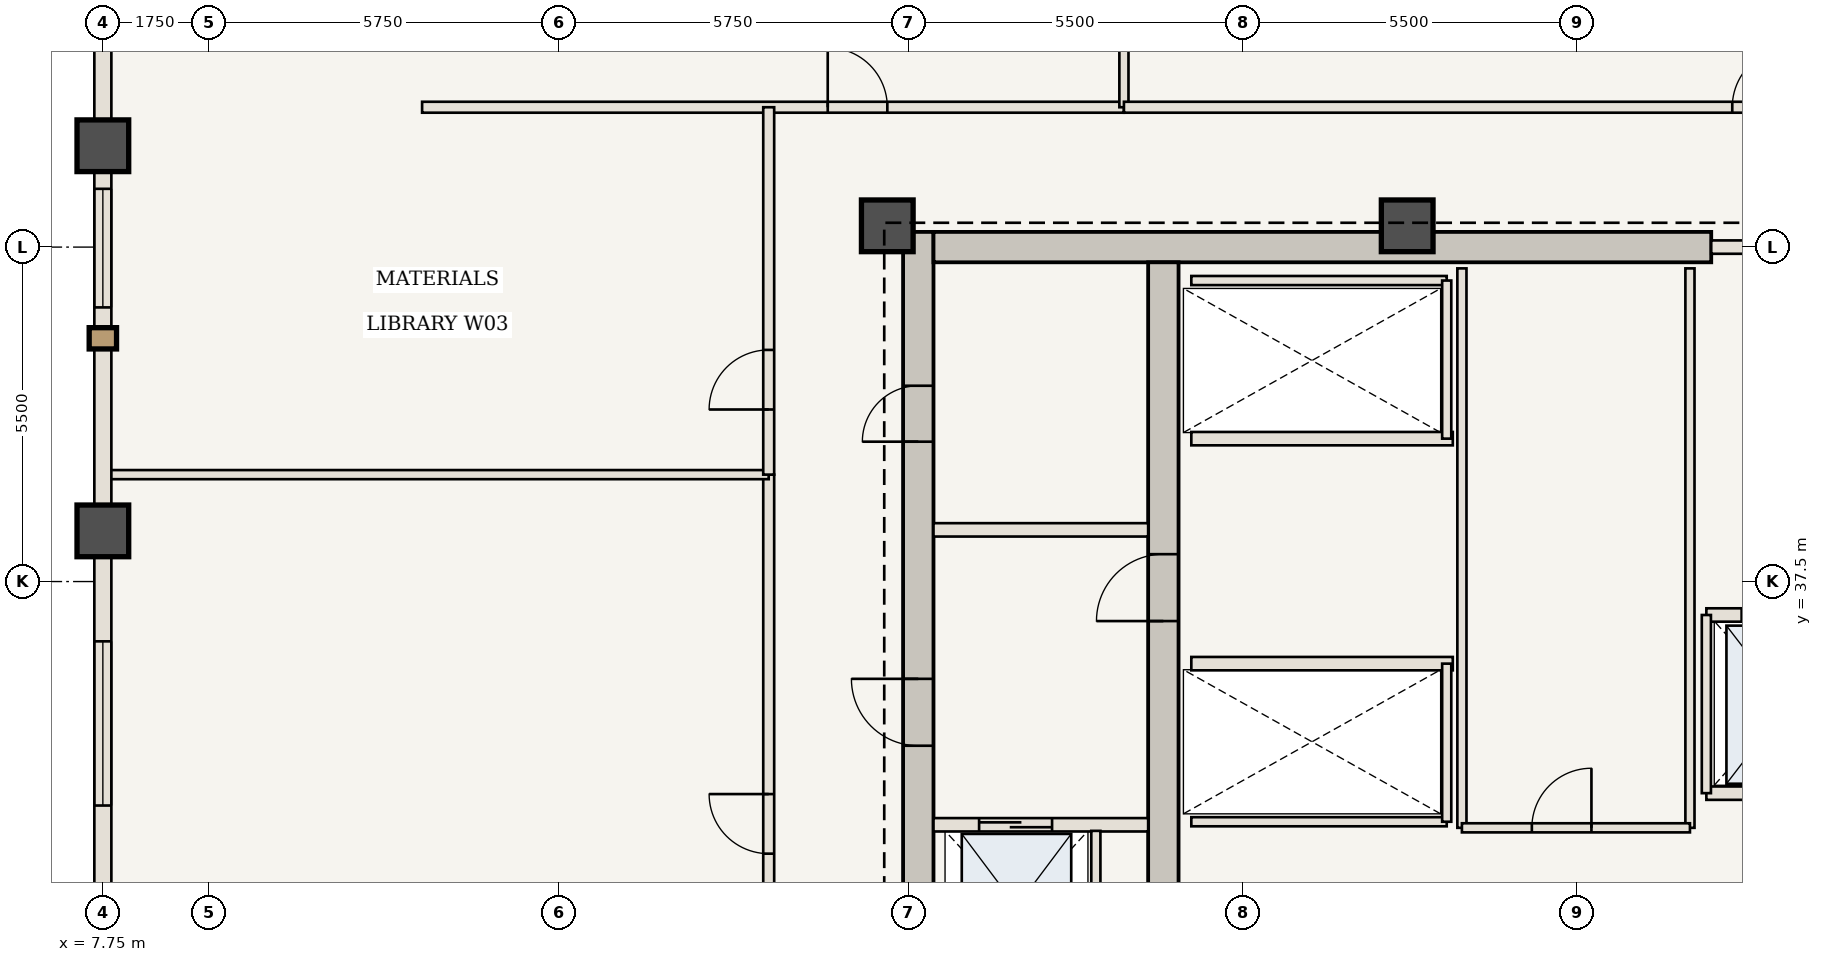
"""IFC4 building model, lengths in metres.
Left out: names, types, materials, properties, quantities, classifications, styles, units other than length and angle.
Written with IfcOpenShell. Run it as: python <this file> out.ifc"""

import sys

from ifc_helpers import new_model, si_unit, direction, frame, frame_2d, origin, origin_2d, place, context, subcontext, project, spatial, rectangle, extrude, element, fill, save


model = new_model("IFC4")
c1 = context("Model", 3, precision=1e-05, world=origin(), true_north=direction((0.0, 1.0)))
c2 = subcontext(c1, "Body", "Model", "MODEL_VIEW")
j1 = project(units=[si_unit("LENGTHUNIT", "METRE"), si_unit("PLANEANGLEUNIT", "RADIAN")], contexts=[c1])
p1 = place(None, origin())
s1 = spatial("IfcSite", under=j1, at=p1, CompositionType="ELEMENT")
p2 = place(p1, origin())
s2 = spatial("IfcBuilding", under=s1, at=p2, CompositionType="ELEMENT")
p3 = place(p2, frame((0.0, 0.0, 210.0)))
s3 = spatial("IfcBuildingStorey", under=s2, at=p3, CompositionType="ELEMENT", Elevation=210.0)
p4 = place(p3, frame((21.16, 30.6, 0.0), z_axis=(0.0, 0.0, 1.0), x_axis=(0.0, 1.0, 0.0)))
e1 = element("IfcWall", 1, at=p4, inside=s3, PredefinedType="SHEAR", context=c2, shape_type="SweptSolid", body=[
    extrude(rectangle(XDim=12.65, YDim=0.5, at=frame_2d((6.325, 0.0))), origin(), (0.0, 0.0, 1.0), 3.85),
])
p5 = place(p4, frame((4.2, 0.0, 0.0)))
e2 = element("IfcOpeningElement", 2, at=p5, cuts=e1, PredefinedType="OPENING", context=c2, shape_type="SweptSolid", body=[
    extrude(rectangle(XDim=1.1, YDim=2.15, at=frame_2d((0.55, 1.075))), frame((0.0, 0.26, 0.0), z_axis=(0.0, -1.0, 0.0), x_axis=(1.0, 0.0, 0.0)), (0.0, 0.0, 1.0), 0.52),
])
p6 = place(p4, frame((9.2, 0.0, 0.0)))
e3 = element("IfcOpeningElement", 3, at=p6, cuts=e1, PredefinedType="OPENING", context=c2, shape_type="SweptSolid", body=[
    extrude(rectangle(XDim=0.92, YDim=2.1, at=frame_2d((0.46, 1.05))), frame((0.0, 0.26, 0.0), z_axis=(0.0, -1.0, 0.0), x_axis=(1.0, 0.0, 0.0)), (0.0, 0.0, 1.0), 0.52),
])
p7 = place(p3, frame((21.41, 43.0, 0.0), z_axis=(0.0, 0.0, 1.0), x_axis=(1.0, 0.0, 0.0)))
e4 = element("IfcWall", 4, at=p7, inside=s3, PredefinedType="SHEAR", context=c2, shape_type="SweptSolid", body=[
    extrude(rectangle(XDim=12.79, YDim=0.5, at=frame_2d((6.395, 0.0))), origin(), (0.0, 0.0, 1.0), 3.85),
])
p8 = place(p3, frame((25.19, 30.6, 0.0), z_axis=(0.0, 0.0, 1.0), x_axis=(0.0, 1.0, 0.0)))
e5 = element("IfcWall", 5, at=p8, inside=s3, PredefinedType="SHEAR", context=c2, shape_type="SweptSolid", body=[
    extrude(rectangle(XDim=12.15, YDim=0.5, at=frame_2d((6.075, 0.0))), origin(), (0.0, 0.0, 1.0), 3.85),
])
p9 = place(p8, frame((6.25, 0.0, 0.0)))
e6 = element("IfcOpeningElement", 6, at=p9, cuts=e5, PredefinedType="OPENING", context=c2, shape_type="SweptSolid", body=[
    extrude(rectangle(XDim=1.1, YDim=2.15, at=frame_2d((0.55, 1.075))), frame((0.0, 0.26, 0.0), z_axis=(0.0, -1.0, 0.0), x_axis=(1.0, 0.0, 0.0)), (0.0, 0.0, 1.0), 0.52),
])
for number, where, z_axis, x_axis in (
    (7, (29.2, 43.35, 0.0), (0.0, 0.0, 1.0), (1.0, 0.0, 0.0)),
    (8, (20.65, 43.35, 0.0), (0.0, 0.0, 1.0), (1.0, 0.0, 0.0)),
    (9, (7.75, 38.333, 0.0), (0.0, 0.0, 1.0), (1.0, 0.0, 0.0)),
    (10, (7.75, 44.667, 0.0), (0.0, 0.0, 1.0), (1.0, 0.0, 0.0)),
):
    element("IfcColumn", number, at=place(p3, frame(where, z_axis=z_axis, x_axis=x_axis)), inside=s3, PredefinedType="COLUMN", context=c2, shape_type="SweptSolid", body=[
        extrude(rectangle(XDim=0.85, YDim=0.85, at=origin_2d()), origin(), (0.0, 0.0, 1.0), 3.85),
    ])
p10 = place(p3, frame((21.41, 33.5, 0.0), z_axis=(0.0, 0.0, 1.0), x_axis=(1.0, 0.0, 0.0)))
e11 = element("IfcWall", 11, at=p10, inside=s3, PredefinedType="STANDARD", context=c2, shape_type="SweptSolid", body=[
    extrude(rectangle(XDim=3.53, YDim=0.22, at=frame_2d((1.765, 0.0))), origin(), (0.0, 0.0, 1.0), 3.685),
])
p11 = place(p10, frame((0.75, 0.0, 0.0)))
e12 = element("IfcOpeningElement", 12, at=p11, cuts=e11, PredefinedType="OPENING", context=c2, shape_type="SweptSolid", body=[
    extrude(rectangle(XDim=1.2, YDim=2.2, at=frame_2d((0.6, 1.1))), frame((0.0, 0.12, 0.0), z_axis=(0.0, -1.0, 0.0), x_axis=(1.0, 0.0, 0.0)), (0.0, 0.0, 1.0), 0.24),
])
p12 = place(p3, frame((24.08, 30.75, 0.0), z_axis=(0.0, 0.0, 1.0), x_axis=(0.0, 1.0, 0.0)))
e13 = element("IfcWall", 13, at=p12, inside=s3, PredefinedType="STANDARD", context=c2, shape_type="SweptSolid", body=[
    extrude(rectangle(XDim=2.65, YDim=0.15, at=frame_2d((1.325, 0.0))), origin(), (0.0, 0.0, 1.0), 3.685),
])
p13 = place(p3, frame((21.41, 38.35, 0.0), z_axis=(0.0, 0.0, 1.0), x_axis=(1.0, 0.0, 0.0)))
e14 = element("IfcWall", 14, at=p13, inside=s3, PredefinedType="STANDARD", context=c2, shape_type="SweptSolid", body=[
    extrude(rectangle(XDim=3.53, YDim=0.22, at=frame_2d((1.765, 0.0))), origin(), (0.0, 0.0, 1.0), 3.685),
])
p14 = place(p3, frame((25.65, 36.15, 0.0), z_axis=(0.0, 0.0, 1.0), x_axis=(1.0, 0.0, 0.0)))
e15 = element("IfcWall", 15, at=p14, inside=s3, PredefinedType="STANDARD", context=c2, shape_type="SweptSolid", body=[
    extrude(rectangle(XDim=4.3, YDim=0.22, at=frame_2d((2.15, 0.0))), origin(), (0.0, 0.0, 1.0), 3.685),
])
p15 = place(p3, frame((25.65, 33.55, 0.0), z_axis=(0.0, 0.0, 1.0), x_axis=(1.0, 0.0, 0.0)))
e16 = element("IfcWall", 16, at=p15, inside=s3, PredefinedType="STANDARD", context=c2, shape_type="SweptSolid", body=[
    extrude(rectangle(XDim=4.2, YDim=0.15, at=frame_2d((2.1, 0.0))), origin(), (0.0, 0.0, 1.0), 3.685),
])
p16 = place(p3, frame((29.85, 33.55, 0.0), z_axis=(0.0, 0.0, 1.0), x_axis=(0.0, 1.0, 0.0)))
e17 = element("IfcWall", 17, at=p16, inside=s3, PredefinedType="STANDARD", context=c2, shape_type="SweptSolid", body=[
    extrude(rectangle(XDim=2.6, YDim=0.15, at=frame_2d((1.3, 0.0))), origin(), (0.0, 0.0, 1.0), 3.685),
])
p17 = place(p3, frame((25.65, 39.85, 0.0), z_axis=(0.0, 0.0, 1.0), x_axis=(1.0, 0.0, 0.0)))
e18 = element("IfcWall", 18, at=p17, inside=s3, PredefinedType="STANDARD", context=c2, shape_type="SweptSolid", body=[
    extrude(rectangle(XDim=4.3, YDim=0.22, at=frame_2d((2.15, 0.0))), origin(), (0.0, 0.0, 1.0), 3.685),
])
p18 = place(p3, frame((25.65, 42.45, 0.0), z_axis=(0.0, 0.0, 1.0), x_axis=(1.0, 0.0, 0.0)))
e19 = element("IfcWall", 19, at=p18, inside=s3, PredefinedType="STANDARD", context=c2, shape_type="SweptSolid", body=[
    extrude(rectangle(XDim=4.2, YDim=0.15, at=frame_2d((2.1, 0.0))), origin(), (0.0, 0.0, 1.0), 3.685),
])
p19 = place(p3, frame((29.85, 39.85, 0.0), z_axis=(0.0, 0.0, 1.0), x_axis=(0.0, 1.0, 0.0)))
e20 = element("IfcWall", 20, at=p19, inside=s3, PredefinedType="STANDARD", context=c2, shape_type="SweptSolid", body=[
    extrude(rectangle(XDim=2.6, YDim=0.15, at=frame_2d((1.3, 0.0))), origin(), (0.0, 0.0, 1.0), 3.685),
])
for number, where, z_axis, x_axis in (
    (21, (30.1, 33.45, 0.0), (0.0, 0.0, 1.0), (0.0, 1.0, 0.0)),
    (22, (33.85, 33.45, 0.0), (0.0, 0.0, 1.0), (0.0, 1.0, 0.0)),
):
    element("IfcWall", number, at=place(p3, frame(where, z_axis=z_axis, x_axis=x_axis)), inside=s3, PredefinedType="STANDARD", context=c2, shape_type="SweptSolid", body=[
        extrude(rectangle(XDim=9.2, YDim=0.15, at=frame_2d((4.6, 0.0))), origin(), (0.0, 0.0, 1.0), 3.685),
    ])
p20 = place(p3, frame((30.1, 33.45, 0.0), z_axis=(0.0, 0.0, 1.0), x_axis=(1.0, 0.0, 0.0)))
e23 = element("IfcWall", 23, at=p20, inside=s3, PredefinedType="STANDARD", context=c2, shape_type="SweptSolid", body=[
    extrude(rectangle(XDim=3.75, YDim=0.15, at=frame_2d((1.875, 0.0))), origin(), (0.0, 0.0, 1.0), 3.685),
])
p21 = place(p20, frame((1.15, 0.0, 0.0)))
e24 = element("IfcOpeningElement", 24, at=p21, cuts=e23, PredefinedType="OPENING", context=c2, shape_type="SweptSolid", body=[
    extrude(rectangle(XDim=0.98, YDim=2.2, at=frame_2d((0.49, 1.1))), frame((0.0, 0.085, 0.0), z_axis=(0.0, -1.0, 0.0), x_axis=(1.0, 0.0, 0.0)), (0.0, 0.0, 1.0), 0.17),
])
p22 = place(p3, frame((34.2, 43.0, 0.0), z_axis=(0.0, 0.0, 1.0), x_axis=(1.0, 0.0, 0.0)))
e25 = element("IfcWall", 25, at=p22, inside=s3, PredefinedType="STANDARD", context=c2, shape_type="SweptSolid", body=[
    extrude(rectangle(XDim=3.55, YDim=0.22, at=frame_2d((1.775, 0.0))), origin(), (0.0, 0.0, 1.0), 3.685),
])
p23 = place(p22, frame((1.4, 0.0, 0.0)))
e26 = element("IfcOpeningElement", 26, at=p23, cuts=e25, PredefinedType="OPENING", context=c2, shape_type="SweptSolid", body=[
    extrude(rectangle(XDim=1.1, YDim=2.15, at=frame_2d((0.55, 1.075))), frame((0.0, 0.12, 0.0), z_axis=(0.0, -1.0, 0.0), x_axis=(1.0, 0.0, 0.0)), (0.0, 0.0, 1.0), 0.24),
])
p24 = place(p3, frame((34.12, 36.95, 0.0), z_axis=(0.0, 0.0, 1.0), x_axis=(1.0, 0.0, 0.0)))
e27 = element("IfcWall", 27, at=p24, inside=s3, PredefinedType="STANDARD", context=c2, shape_type="SweptSolid", body=[
    extrude(rectangle(XDim=2.68, YDim=0.22, at=frame_2d((1.34, 0.0))), origin(), (0.0, 0.0, 1.0), 3.685),
])
p25 = place(p24, frame((0.58, 0.0, 0.0)))
e28 = element("IfcOpeningElement", 28, at=p25, cuts=e27, PredefinedType="OPENING", context=c2, shape_type="SweptSolid", body=[
    extrude(rectangle(XDim=1.2, YDim=2.2, at=frame_2d((0.6, 1.1))), frame((0.0, 0.12, 0.0), z_axis=(0.0, -1.0, 0.0), x_axis=(1.0, 0.0, 0.0)), (0.0, 0.0, 1.0), 0.24),
])
p26 = place(p3, frame((34.12, 34.02, 0.0), z_axis=(0.0, 0.0, 1.0), x_axis=(1.0, 0.0, 0.0)))
e29 = element("IfcWall", 29, at=p26, inside=s3, PredefinedType="STANDARD", context=c2, shape_type="SweptSolid", body=[
    extrude(rectangle(XDim=2.68, YDim=0.22, at=frame_2d((1.34, 0.0))), origin(), (0.0, 0.0, 1.0), 3.685),
])
p27 = place(p3, frame((34.12, 34.02, 0.0), z_axis=(0.0, 0.0, 1.0), x_axis=(0.0, 1.0, 0.0)))
e30 = element("IfcWall", 30, at=p27, inside=s3, PredefinedType="STANDARD", context=c2, shape_type="SweptSolid", body=[
    extrude(rectangle(XDim=2.93, YDim=0.15, at=frame_2d((1.465, 0.0))), origin(), (0.0, 0.0, 1.0), 3.685),
])
p28 = place(p3, frame((13.0, 45.3, 0.0), z_axis=(0.0, 0.0, 1.0), x_axis=(1.0, 0.0, 0.0)))
e31 = element("IfcWall", 31, at=p28, inside=s3, PredefinedType="STANDARD", context=c2, shape_type="SweptSolid", body=[
    extrude(rectangle(XDim=11.542, YDim=0.18, at=frame_2d((5.771, 0.0))), origin(), (0.0, 0.0, 1.0), 3.685),
])
p29 = place(p28, frame((6.671, 0.0, 0.0)))
e32 = element("IfcOpeningElement", 32, at=p29, cuts=e31, PredefinedType="OPENING", context=c2, shape_type="SweptSolid", body=[
    extrude(rectangle(XDim=0.98, YDim=2.2, at=frame_2d((0.49, 1.1))), frame((0.0, 0.1, 0.0), z_axis=(0.0, -1.0, 0.0), x_axis=(1.0, 0.0, 0.0)), (0.0, 0.0, 1.0), 0.2),
])
p30 = place(p3, frame((24.542, 45.3, 0.0), z_axis=(0.0, 0.0, 1.0), x_axis=(0.0, 1.0, 0.0)))
e33 = element("IfcWall", 33, at=p30, inside=s3, PredefinedType="STANDARD", context=c2, shape_type="SweptSolid", body=[
    extrude(rectangle(XDim=10.89, YDim=0.15, at=frame_2d((5.445, 0.0))), origin(), (0.0, 0.0, 1.0), 3.685),
])
p31 = place(p3, frame((24.542, 45.3, 0.0), z_axis=(0.0, 0.0, 1.0), x_axis=(1.0, 0.0, 0.0)))
e34 = element("IfcWall", 34, at=p31, inside=s3, PredefinedType="STANDARD", context=c2, shape_type="SweptSolid", body=[
    extrude(rectangle(XDim=26.458, YDim=0.18, at=frame_2d((13.229, 0.0))), origin(), (0.0, 0.0, 1.0), 3.685),
])
p32 = place(p31, frame((10.004, 0.0, 0.0)))
e35 = element("IfcOpeningElement", 35, at=p32, cuts=e34, PredefinedType="OPENING", context=c2, shape_type="SweptSolid", body=[
    extrude(rectangle(XDim=0.98, YDim=2.2, at=frame_2d((0.49, 1.1))), frame((0.0, 0.1, 0.0), z_axis=(0.0, -1.0, 0.0), x_axis=(1.0, 0.0, 0.0)), (0.0, 0.0, 1.0), 0.2),
])
p33 = place(p3, frame((18.7, 24.892, 0.0), z_axis=(0.0, 0.0, 1.0), x_axis=(0.0, 1.0, 0.0)))
e36 = element("IfcWall", 36, at=p33, inside=s3, PredefinedType="STANDARD", context=c2, shape_type="SweptSolid", body=[
    extrude(rectangle(XDim=14.367, YDim=0.18, at=frame_2d((7.183, 0.0))), origin(), (0.0, 0.0, 1.0), 3.685),
])
p34 = place(p33, frame((8.133, 0.0, 0.0)))
e37 = element("IfcOpeningElement", 37, at=p34, cuts=e36, PredefinedType="OPENING", context=c2, shape_type="SweptSolid", body=[
    extrude(rectangle(XDim=0.98, YDim=2.2, at=frame_2d((0.49, 1.1))), frame((0.0, 0.1, 0.0), z_axis=(0.0, -1.0, 0.0), x_axis=(1.0, 0.0, 0.0)), (0.0, 0.0, 1.0), 0.2),
])
p35 = place(p3, frame((7.81, 39.258, 0.0), z_axis=(0.0, 0.0, 1.0), x_axis=(1.0, 0.0, 0.0)))
e38 = element("IfcWall", 38, at=p35, inside=s3, PredefinedType="STANDARD", context=c2, shape_type="SweptSolid", body=[
    extrude(rectangle(XDim=10.89, YDim=0.15, at=frame_2d((5.445, 0.0))), origin(), (0.0, 0.0, 1.0), 3.685),
])
p36 = place(p3, frame((18.7, 39.258, 0.0), z_axis=(0.0, 0.0, 1.0), x_axis=(0.0, 1.0, 0.0)))
e39 = element("IfcWall", 39, at=p36, inside=s3, PredefinedType="STANDARD", context=c2, shape_type="SweptSolid", body=[
    extrude(rectangle(XDim=6.042, YDim=0.18, at=frame_2d((3.021, 0.0))), origin(), (0.0, 0.0, 1.0), 3.685),
])
p37 = place(p36, frame((1.071, 0.0, 0.0)))
e40 = element("IfcOpeningElement", 40, at=p37, cuts=e39, PredefinedType="OPENING", context=c2, shape_type="SweptSolid", body=[
    extrude(rectangle(XDim=0.98, YDim=2.2, at=frame_2d((0.49, 1.1))), frame((0.0, 0.1, 0.0), z_axis=(0.0, -1.0, 0.0), x_axis=(1.0, 0.0, 0.0)), (0.0, 0.0, 1.0), 0.2),
])
p38 = place(p3, frame((7.75, 32.0, 0.0), z_axis=(0.0, 0.0, 1.0), x_axis=(0.0, 1.0, 0.0)))
e41 = element("IfcWall", 41, at=p38, inside=s3, PredefinedType="USERDEFINED", context=c2, shape_type="SweptSolid", body=[
    extrude(rectangle(XDim=6.333, YDim=0.28, at=frame_2d((3.167, 0.0))), origin(), (0.0, 0.0, 1.0), 2.985),
])
p39 = place(p38, frame((1.817, 0.0, 0.85)))
e42 = element("IfcOpeningElement", 42, at=p39, cuts=e41, PredefinedType="OPENING", context=c2, shape_type="SweptSolid", body=[
    extrude(rectangle(XDim=2.7, YDim=1.935, at=frame_2d((1.35, 0.968))), frame((0.0, 0.15, 0.0), z_axis=(0.0, -1.0, 0.0), x_axis=(1.0, 0.0, 0.0)), (0.0, 0.0, 1.0), 0.3),
])
p40 = place(p3, frame((7.75, 38.333, 0.0), z_axis=(0.0, 0.0, 1.0), x_axis=(0.0, 1.0, 0.0)))
e43 = element("IfcWall", 43, at=p40, inside=s3, PredefinedType="USERDEFINED", context=c2, shape_type="SweptSolid", body=[
    extrude(rectangle(XDim=6.333, YDim=0.28, at=frame_2d((3.167, 0.0))), origin(), (0.0, 0.0, 1.0), 2.985),
])
p41 = place(p40, frame((3.675, 0.0, 0.85)))
e44 = element("IfcOpeningElement", 44, at=p41, cuts=e43, PredefinedType="OPENING", context=c2, shape_type="SweptSolid", body=[
    extrude(rectangle(XDim=1.95, YDim=1.935, at=frame_2d((0.975, 0.968))), frame((0.0, 0.15, 0.0), z_axis=(0.0, -1.0, 0.0), x_axis=(1.0, 0.0, 0.0)), (0.0, 0.0, 1.0), 0.3),
])
p42 = place(p3, frame((7.75, 44.667, 0.0), z_axis=(0.0, 0.0, 1.0), x_axis=(0.0, 1.0, 0.0)))
e45 = element("IfcWall", 45, at=p42, inside=s3, PredefinedType="USERDEFINED", context=c2, shape_type="SweptSolid", body=[
    extrude(rectangle(XDim=6.333, YDim=0.28, at=frame_2d((3.167, 0.0))), origin(), (0.0, 0.0, 1.0), 2.985),
])
p43 = place(p5, origin())
e46 = element("IfcDoor", 46, at=p43, inside=s3, OperationType="SINGLE_SWING_RIGHT", PredefinedType="DOOR", context=c2, shape_type="SweptSolid", body=[
    extrude(rectangle(XDim=1.1, YDim=2.15, at=frame_2d((0.55, 1.075))), frame((0.0, 0.025, 0.0), z_axis=(0.0, -1.0, 0.0), x_axis=(1.0, 0.0, 0.0)), (0.0, 0.0, 1.0), 0.05),
])
fill(e2, e46)
p44 = place(p9, origin())
e47 = element("IfcDoor", 47, at=p44, inside=s3, OperationType="SINGLE_SWING_LEFT", PredefinedType="DOOR", context=c2, shape_type="SweptSolid", body=[
    extrude(rectangle(XDim=1.1, YDim=2.15, at=frame_2d((0.55, 1.075))), frame((0.0, 0.025, 0.0), z_axis=(0.0, -1.0, 0.0), x_axis=(1.0, 0.0, 0.0)), (0.0, 0.0, 1.0), 0.05),
])
fill(e6, e47)
p45 = place(p6, origin())
e48 = element("IfcDoor", 48, at=p45, inside=s3, OperationType="SINGLE_SWING_LEFT", PredefinedType="DOOR", context=c2, shape_type="SweptSolid", body=[
    extrude(rectangle(XDim=0.92, YDim=2.1, at=frame_2d((0.46, 1.05))), frame((0.0, 0.025, 0.0), z_axis=(0.0, -1.0, 0.0), x_axis=(1.0, 0.0, 0.0)), (0.0, 0.0, 1.0), 0.05),
])
fill(e3, e48)
p46 = place(p11, origin())
e49 = element("IfcDoor", 49, at=p46, inside=s3, OperationType="DOUBLE_DOOR_SLIDING", PredefinedType="DOOR", context=c2, shape_type="SweptSolid", body=[
    extrude(rectangle(XDim=1.2, YDim=2.2, at=frame_2d((0.6, 1.1))), frame((0.0, 0.025, 0.0), z_axis=(0.0, -1.0, 0.0), x_axis=(1.0, 0.0, 0.0)), (0.0, 0.0, 1.0), 0.05),
])
fill(e12, e49)
p47 = place(p21, origin())
e50 = element("IfcDoor", 50, at=p47, inside=s3, OperationType="SINGLE_SWING_RIGHT", PredefinedType="DOOR", context=c2, shape_type="SweptSolid", body=[
    extrude(rectangle(XDim=0.98, YDim=2.2, at=frame_2d((0.49, 1.1))), frame((0.0, 0.025, 0.0), z_axis=(0.0, -1.0, 0.0), x_axis=(1.0, 0.0, 0.0)), (0.0, 0.0, 1.0), 0.05),
])
fill(e24, e50)
p48 = place(p29, origin())
e51 = element("IfcDoor", 51, at=p48, inside=s3, OperationType="SINGLE_SWING_LEFT", PredefinedType="DOOR", context=c2, shape_type="SweptSolid", body=[
    extrude(rectangle(XDim=0.98, YDim=2.2, at=frame_2d((0.49, 1.1))), frame((0.0, 0.025, 0.0), z_axis=(0.0, -1.0, 0.0), x_axis=(1.0, 0.0, 0.0)), (0.0, 0.0, 1.0), 0.05),
])
fill(e32, e51)
p49 = place(p32, origin())
e52 = element("IfcDoor", 52, at=p49, inside=s3, OperationType="SINGLE_SWING_RIGHT", PredefinedType="DOOR", context=c2, shape_type="SweptSolid", body=[
    extrude(rectangle(XDim=0.98, YDim=2.2, at=frame_2d((0.49, 1.1))), frame((0.0, 0.025, 0.0), z_axis=(0.0, -1.0, 0.0), x_axis=(1.0, 0.0, 0.0)), (0.0, 0.0, 1.0), 0.05),
])
fill(e35, e52)
p50 = place(p34, origin())
e53 = element("IfcDoor", 53, at=p50, inside=s3, OperationType="SINGLE_SWING_RIGHT", PredefinedType="DOOR", context=c2, shape_type="SweptSolid", body=[
    extrude(rectangle(XDim=0.98, YDim=2.2, at=frame_2d((0.49, 1.1))), frame((0.0, 0.025, 0.0), z_axis=(0.0, -1.0, 0.0), x_axis=(1.0, 0.0, 0.0)), (0.0, 0.0, 1.0), 0.05),
])
fill(e37, e53)
p51 = place(p37, origin())
e54 = element("IfcDoor", 54, at=p51, inside=s3, OperationType="SINGLE_SWING_LEFT", PredefinedType="DOOR", context=c2, shape_type="SweptSolid", body=[
    extrude(rectangle(XDim=0.98, YDim=2.2, at=frame_2d((0.49, 1.1))), frame((0.0, 0.025, 0.0), z_axis=(0.0, -1.0, 0.0), x_axis=(1.0, 0.0, 0.0)), (0.0, 0.0, 1.0), 0.05),
])
fill(e40, e54)
p52 = place(p39, origin())
e55 = element("IfcWindow", 55, at=p52, inside=s3, PartitioningType="SINGLE_PANEL", PredefinedType="WINDOW", context=c2, shape_type="SweptSolid", body=[
    extrude(rectangle(XDim=2.7, YDim=1.935, at=frame_2d((1.35, 0.968))), frame((0.0, 0.03, 0.0), z_axis=(0.0, -1.0, 0.0), x_axis=(1.0, 0.0, 0.0)), (0.0, 0.0, 1.0), 0.06),
])
fill(e42, e55)
p53 = place(p41, origin())
e56 = element("IfcWindow", 56, at=p53, inside=s3, PartitioningType="SINGLE_PANEL", PredefinedType="WINDOW", context=c2, shape_type="SweptSolid", body=[
    extrude(rectangle(XDim=1.95, YDim=1.935, at=frame_2d((0.975, 0.968))), frame((0.0, 0.03, 0.0), z_axis=(0.0, -1.0, 0.0), x_axis=(1.0, 0.0, 0.0)), (0.0, 0.0, 1.0), 0.06),
])
fill(e44, e56)
save(model, sys.argv[1])
